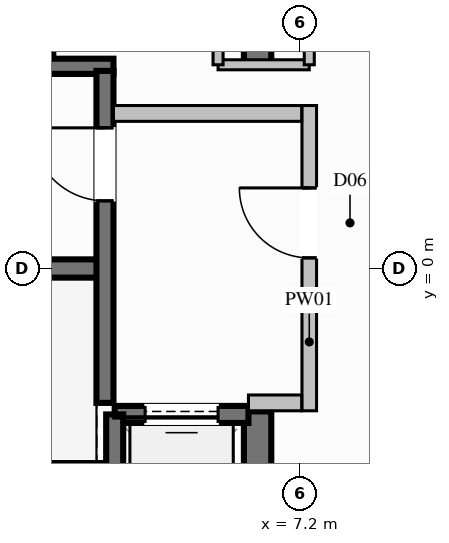
"""IFC4 building model, lengths in metres.
Left out: names, types, materials, properties, quantities, classifications, styles, units other than length and angle.
Written with IfcOpenShell. Run it as: python <this file> out.ifc"""

import sys

from ifc_helpers import new_model, si_unit, direction, frame, frame_2d, origin, place, context, subcontext, project, spatial, rectangle, extrude, element, fill, save


model = new_model("IFC4")
c1 = context("Model", 3, precision=1e-05, world=origin(), true_north=direction((0.0, 1.0)))
c2 = subcontext(c1, "Body", "Model", "MODEL_VIEW")
j1 = project(units=[si_unit("LENGTHUNIT", "METRE"), si_unit("PLANEANGLEUNIT", "RADIAN")], contexts=[c1])
p1 = place(None, origin())
s1 = spatial("IfcSite", under=j1, at=p1, CompositionType="ELEMENT")
p2 = place(p1, origin())
s2 = spatial("IfcBuilding", under=s1, at=p2, CompositionType="ELEMENT")
p3 = place(p2, frame((0.0, 0.0, 278.2)))
s3 = spatial("IfcBuildingStorey", under=s2, at=p3, CompositionType="ELEMENT", Elevation=278.2)
p4 = place(p3, frame((-3.99, 0.0, 0.0), z_axis=(0.0, 0.0, 1.0), x_axis=(1.0, 0.0, 0.0)))
e1 = element("IfcWall", 1, at=p4, inside=s3, PredefinedType="SHEAR", context=c2, shape_type="SweptSolid", body=[
    extrude(rectangle(XDim=7.98, YDim=0.3, at=frame_2d((3.99, 0.0))), origin(), (0.0, 0.0, 1.0), 3.8),
])
for number, where, z_axis, x_axis in (
    (2, (-4.13, -3.325, 0.0), (0.0, 0.0, 1.0), (1.0, 0.0, 0.0)),
    (3, (-4.13, 3.325, 0.0), (0.0, 0.0, 1.0), (1.0, 0.0, 0.0)),
):
    element("IfcWall", number, at=place(p3, frame(where, z_axis=z_axis, x_axis=x_axis)), inside=s3, PredefinedType="SOLIDWALL", context=c2, shape_type="SweptSolid", body=[
        extrude(rectangle(XDim=8.26, YDim=0.25, at=frame_2d((4.13, 0.0))), origin(), (0.0, 0.0, 1.0), 3.8),
    ])
p5 = place(p3, frame((6.5, -6.325, 0.0), z_axis=(0.0, 0.0, 1.0), x_axis=(0.0, 1.0, 0.0)))
e4 = element("IfcWall", 4, at=p5, inside=s3, PredefinedType="SHEAR", context=c2, shape_type="SweptSolid", body=[
    extrude(rectangle(XDim=3.975, YDim=0.45, at=frame_2d((1.987, 0.0))), origin(), (0.0, 0.0, 1.0), 3.8),
])
p6 = place(p3, frame((6.5, 3.35, 0.0), z_axis=(0.0, 0.0, 1.0), x_axis=(0.0, 1.0, 0.0)))
e5 = element("IfcWall", 5, at=p6, inside=s3, PredefinedType="SHEAR", context=c2, shape_type="SweptSolid", body=[
    extrude(rectangle(XDim=2.975, YDim=0.45, at=frame_2d((1.487, 0.0))), origin(), (0.0, 0.0, 1.0), 3.8),
])
p7 = place(p3, frame((3.0, 3.5, 0.0), z_axis=(0.0, 0.0, 1.0), x_axis=(0.0, 1.0, 0.0)))
e6 = element("IfcWall", 6, at=p7, inside=s3, PredefinedType="SOLIDWALL", context=c2, shape_type="SweptSolid", body=[
    extrude(rectangle(XDim=2.5, YDim=0.28, at=frame_2d((1.25, 0.0))), origin(), (0.0, 0.0, 1.0), 3.57),
])
p8 = place(p3, frame((6.35, -2.4, 0.0), z_axis=(0.0, 0.0, 1.0), x_axis=(-1.0, 0.0, 0.0)))
e7 = element("IfcWall", 7, at=p8, inside=s3, PredefinedType="SOLIDWALL", context=c2, shape_type="SweptSolid", body=[
    extrude(rectangle(XDim=2.2, YDim=0.28, at=frame_2d((1.1, 0.0))), origin(), (0.0, 0.0, 1.0), 3.57),
])
p9 = place(p8, frame((0.5, 0.0, 0.0)))
e8 = element("IfcOpeningElement", 8, at=p9, cuts=e7, PredefinedType="OPENING", context=c2, shape_type="SweptSolid", body=[
    extrude(rectangle(XDim=1.2, YDim=2.2, at=frame_2d((0.6, 1.1))), frame((0.0, 0.15, 0.0), z_axis=(0.0, -1.0, 0.0), x_axis=(1.0, 0.0, 0.0)), (0.0, 0.0, 1.0), 0.3),
])
p10 = place(p3, frame((4.15, -2.4, 0.0), z_axis=(0.0, 0.0, 1.0), x_axis=(0.0, -1.0, 0.0)))
e9 = element("IfcWall", 9, at=p10, inside=s3, PredefinedType="SOLIDWALL", context=c2, shape_type="SweptSolid", body=[
    extrude(rectangle(XDim=2.7, YDim=0.28, at=frame_2d((1.35, 0.0))), origin(), (0.0, 0.0, 1.0), 3.57),
])
p11 = place(p3, frame((3.99, -2.21, 0.0), z_axis=(0.0, 0.0, 1.0), x_axis=(0.0, 1.0, 0.0)))
e10 = element("IfcWall", 10, at=p11, inside=s3, PredefinedType="SOLIDWALL", context=c2, shape_type="SweptSolid", body=[
    extrude(rectangle(XDim=5.46, YDim=0.28, at=frame_2d((2.73, 0.0))), origin(), (0.0, 0.0, 1.0), 3.57),
])
p12 = place(p11, frame((3.323, 0.0, 0.0)))
e11 = element("IfcOpeningElement", 11, at=p12, cuts=e10, PredefinedType="OPENING", context=c2, shape_type="SweptSolid", body=[
    extrude(rectangle(XDim=1.2, YDim=2.2, at=frame_2d((0.6, 1.1))), frame((0.0, 0.15, 0.0), z_axis=(0.0, -1.0, 0.0), x_axis=(1.0, 0.0, 0.0)), (0.0, 0.0, 1.0), 0.3),
])
p13 = place(p3, frame((7.35, -2.34, 0.0), z_axis=(0.0, 0.0, 1.0), x_axis=(0.0, 1.0, 0.0)))
e12 = element("IfcWall", 12, at=p13, inside=s3, PredefinedType="PARTITIONING", context=c2, shape_type="SweptSolid", body=[
    extrude(rectangle(XDim=5.02, YDim=0.24, at=frame_2d((2.51, 0.0))), origin(), (0.0, 0.0, 1.0), 2.655),
])
p14 = place(p13, frame((2.515, 0.0, 0.0)))
e13 = element("IfcOpeningElement", 13, at=p14, cuts=e12, PredefinedType="OPENING", context=c2, shape_type="SweptSolid", body=[
    extrude(rectangle(XDim=1.15, YDim=2.2, at=frame_2d((0.575, 1.1))), frame((0.0, 0.13, 0.0), z_axis=(0.0, -1.0, 0.0), x_axis=(1.0, 0.0, 0.0)), (0.0, 0.0, 1.0), 0.26),
])
p15 = place(p3, frame((6.35, -2.21, 0.0), z_axis=(0.0, 0.0, 1.0), x_axis=(1.0, 0.0, 0.0)))
e14 = element("IfcWall", 14, at=p15, inside=s3, PredefinedType="PARTITIONING", context=c2, shape_type="SweptSolid", body=[
    extrude(rectangle(XDim=0.875, YDim=0.26, at=frame_2d((0.438, 0.0))), origin(), (0.0, 0.0, 1.0), 3.57),
])
p16 = place(p3, frame((4.13, 2.55, 0.0), z_axis=(0.0, 0.0, 1.0), x_axis=(1.0, 0.0, 0.0)))
e15 = element("IfcWall", 15, at=p16, inside=s3, PredefinedType="PARTITIONING", context=c2, shape_type="SweptSolid", body=[
    extrude(rectangle(XDim=3.095, YDim=0.26, at=frame_2d((1.548, 0.0))), origin(), (0.0, 0.0, 1.0), 3.57),
])
p17 = place(p3, frame((5.85, 3.35, 0.0), z_axis=(0.0, 0.0, 1.0), x_axis=(1.0, 0.0, 0.0)))
e16 = element("IfcWall", 16, at=p17, inside=s3, PredefinedType="PARTITIONING", context=c2, shape_type="SweptSolid", body=[
    extrude(rectangle(XDim=1.5, YDim=0.165, at=frame_2d((0.75, 0.0))), origin(), (0.0, 0.0, 1.0), 3.57),
])
p18 = place(p3, frame((7.35, 3.35, 0.0), z_axis=(0.0, 0.0, 1.0), x_axis=(0.0, 1.0, 0.0)))
e17 = element("IfcWall", 17, at=p18, inside=s3, PredefinedType="PARTITIONING", context=c2, shape_type="SweptSolid", body=[
    extrude(rectangle(XDim=1.95, YDim=0.165, at=frame_2d((0.975, 0.0))), origin(), (0.0, 0.0, 1.0), 3.57),
])
p19 = place(p18, frame((0.5, 0.0, 0.0)))
e18 = element("IfcOpeningElement", 18, at=p19, cuts=e17, PredefinedType="OPENING", context=c2, shape_type="SweptSolid", body=[
    extrude(rectangle(XDim=0.95, YDim=2.1, at=frame_2d((0.475, 1.05))), frame((0.0, 0.093, 0.0), z_axis=(0.0, -1.0, 0.0), x_axis=(1.0, 0.0, 0.0)), (0.0, 0.0, 1.0), 0.185),
])
p20 = place(p3, frame((5.85, 5.3, 0.0), z_axis=(0.0, 0.0, 1.0), x_axis=(0.0, -1.0, 0.0)))
e19 = element("IfcWall", 19, at=p20, inside=s3, PredefinedType="PARTITIONING", context=c2, shape_type="SweptSolid", body=[
    extrude(rectangle(XDim=1.95, YDim=0.165, at=frame_2d((0.975, 0.0))), origin(), (0.0, 0.0, 1.0), 2.655),
])
p21 = place(p9, origin())
e20 = element("IfcDoor", 20, at=p21, inside=s3, OperationType="SLIDING_TO_LEFT", PredefinedType="DOOR", context=c2, shape_type="SweptSolid", body=[
    extrude(rectangle(XDim=1.2, YDim=2.2, at=frame_2d((0.6, 1.1))), frame((0.0, 0.025, 0.0), z_axis=(0.0, -1.0, 0.0), x_axis=(1.0, 0.0, 0.0)), (0.0, 0.0, 1.0), 0.05),
])
fill(e8, e20)
p22 = place(p12, origin())
e21 = element("IfcDoor", 21, at=p22, inside=s3, OperationType="SINGLE_SWING_RIGHT", PredefinedType="DOOR", context=c2, shape_type="SweptSolid", body=[
    extrude(rectangle(XDim=1.2, YDim=2.2, at=frame_2d((0.6, 1.1))), frame((0.0, 0.025, 0.0), z_axis=(0.0, -1.0, 0.0), x_axis=(1.0, 0.0, 0.0)), (0.0, 0.0, 1.0), 0.05),
])
fill(e11, e21)
p23 = place(p14, origin())
e22 = element("IfcDoor", 22, at=p23, inside=s3, OperationType="SINGLE_SWING_RIGHT", PredefinedType="DOOR", context=c2, shape_type="SweptSolid", body=[
    extrude(rectangle(XDim=1.15, YDim=2.2, at=frame_2d((0.575, 1.1))), frame((0.0, 0.025, 0.0), z_axis=(0.0, -1.0, 0.0), x_axis=(1.0, 0.0, 0.0)), (0.0, 0.0, 1.0), 0.05),
])
fill(e13, e22)
save(model, sys.argv[1])
